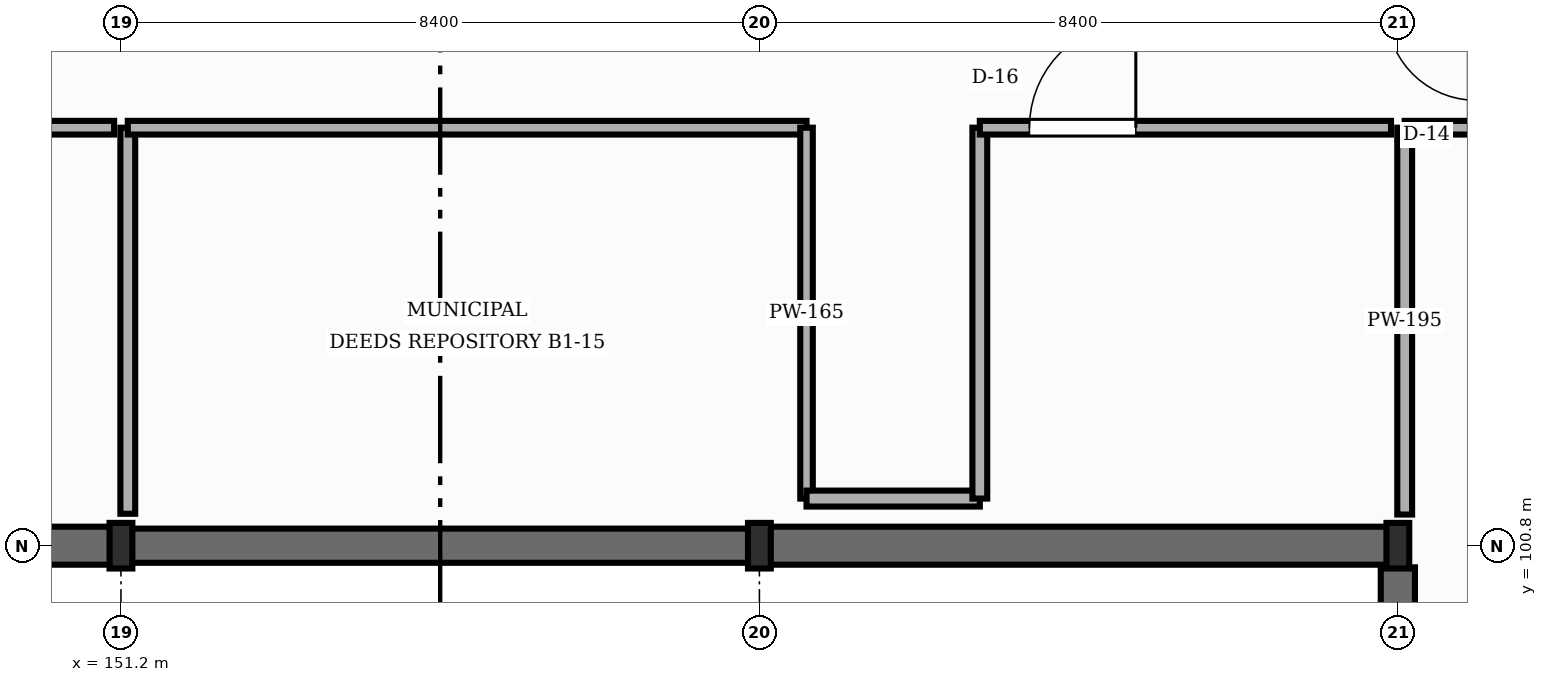
"""IFC4 building model, lengths in metres.
Left out: names, types, materials, properties, quantities, classifications, styles, units other than length and angle.
Written with IfcOpenShell. Run it as: python <this file> out.ifc"""

import sys

from ifc_helpers import new_model, si_unit, direction, frame, frame_2d, origin, origin_2d, place, context, subcontext, project, spatial, rectangle, i_section, extrude, element, fill, save


model = new_model("IFC4")
c1 = context("Model", 3, precision=1e-05, world=origin(), true_north=direction((0.0, 1.0)))
c2 = subcontext(c1, "Body", "Model", "MODEL_VIEW")
j1 = project(units=[si_unit("LENGTHUNIT", "METRE"), si_unit("PLANEANGLEUNIT", "RADIAN")], contexts=[c1])
p1 = place(None, origin())
s1 = spatial("IfcSite", under=j1, at=p1, CompositionType="ELEMENT")
p2 = place(p1, origin())
s2 = spatial("IfcBuilding", under=s1, at=p2, CompositionType="ELEMENT")
p3 = place(p2, frame((0.0, 0.0, -4.5)))
s3 = spatial("IfcBuildingStorey", under=s2, at=p3, CompositionType="ELEMENT", Elevation=-4.5)
for number, where, z_axis, x_axis in (
    (1, (151.2, 100.8, 0.0), (0.0, 0.0, 1.0), (1.0, 0.0, 0.0)),
    (2, (159.6, 100.8, 0.0), (0.0, 0.0, 1.0), (1.0, 0.0, 0.0)),
    (3, (168.0, 100.8, 0.0), (0.0, 0.0, 1.0), (1.0, 0.0, 0.0)),
):
    element("IfcColumn", number, at=place(p3, frame(where, z_axis=z_axis, x_axis=x_axis)), inside=s3, PredefinedType="COLUMN", context=c2, shape_type="SweptSolid", body=[
        extrude(i_section(OverallWidth=0.3, OverallDepth=0.6, WebThickness=0.015, FlangeThickness=0.03, FilletRadius=0.027, at=origin_2d()), origin(), (0.0, 0.0, 1.0), 4.5),
    ])
p4 = place(p3, frame((142.808, 100.8, 0.0), z_axis=(0.0, 0.0, 1.0), x_axis=(1.0, 0.0, 0.0)))
e4 = element("IfcWall", 4, at=p4, inside=s3, PredefinedType="USERDEFINED", context=c2, shape_type="SweptSolid", body=[
    extrude(rectangle(XDim=8.384, YDim=0.5, at=frame_2d((4.192, 0.0))), origin(), (0.0, 0.0, 1.0), 4.25),
])
p5 = place(p3, frame((151.208, 100.8, 0.0), z_axis=(0.0, 0.0, 1.0), x_axis=(1.0, 0.0, 0.0)))
e5 = element("IfcWall", 5, at=p5, inside=s3, PredefinedType="USERDEFINED", context=c2, shape_type="SweptSolid", body=[
    extrude(rectangle(XDim=8.384, YDim=0.45, at=frame_2d((4.192, 0.0))), origin(), (0.0, 0.0, 1.0), 4.25),
])
p6 = place(p3, frame((159.608, 100.8, 0.0), z_axis=(0.0, 0.0, 1.0), x_axis=(1.0, 0.0, 0.0)))
e6 = element("IfcWall", 6, at=p6, inside=s3, PredefinedType="USERDEFINED", context=c2, shape_type="SweptSolid", body=[
    extrude(rectangle(XDim=8.384, YDim=0.5, at=frame_2d((4.192, 0.0))), origin(), (0.0, 0.0, 1.0), 4.25),
])
p7 = place(p3, frame((168.0, 100.515, 0.0), z_axis=(0.0, 0.0, 1.0), x_axis=(0.0, -1.0, 0.0)))
e7 = element("IfcWall", 7, at=p7, inside=s3, PredefinedType="USERDEFINED", context=c2, shape_type="SweptSolid", body=[
    extrude(rectangle(XDim=7.83, YDim=0.45, at=frame_2d((3.915, 0.0))), origin(), (0.0, 0.0, 1.0), 4.25),
])
p8 = place(p3, frame((168.09, 101.21, -0.004), z_axis=(0.0, 0.0, 1.0), x_axis=(0.0, 1.0, 0.0)))
e8 = element("IfcWall", 8, at=p8, inside=s3, PredefinedType="STANDARD", context=c2, shape_type="SweptSolid", body=[
    extrude(rectangle(XDim=5.09, YDim=0.195, at=frame_2d((2.545, 0.0))), origin(), (0.0, 0.0, 1.0), 3.886),
])
p9 = place(p3, frame((168.09, 106.3, -0.004), z_axis=(0.0, 0.0, 1.0), x_axis=(1.0, 0.0, 0.0)))
e9 = element("IfcWall", 9, at=p9, inside=s3, PredefinedType="STANDARD", context=c2, shape_type="SweptSolid", body=[
    extrude(rectangle(XDim=0.94, YDim=0.18, at=frame_2d((0.47, 0.0))), origin(), (0.0, 0.0, 1.0), 4.254),
])
p10 = place(p3, frame((151.29, 101.22, -0.004), z_axis=(0.0, 0.0, 1.0), x_axis=(0.0, 1.0, 0.0)))
e10 = element("IfcWall", 10, at=p10, inside=s3, PredefinedType="STANDARD", context=c2, shape_type="SweptSolid", body=[
    extrude(rectangle(XDim=5.08, YDim=0.195, at=frame_2d((2.54, 0.0))), origin(), (0.0, 0.0, 1.0), 3.746),
])
p11 = place(p3, frame((151.29, 106.3, -0.004), z_axis=(0.0, 0.0, 1.0), x_axis=(1.0, 0.0, 0.0)))
e11 = element("IfcWall", 11, at=p11, inside=s3, PredefinedType="STANDARD", context=c2, shape_type="SweptSolid", body=[
    extrude(rectangle(XDim=8.93, YDim=0.18, at=frame_2d((4.465, 0.0))), origin(), (0.0, 0.0, 1.0), 4.254),
])
p12 = place(p3, frame((160.22, 106.3, -0.004), z_axis=(0.0, 0.0, 1.0), x_axis=(0.0, -1.0, 0.0)))
e12 = element("IfcWall", 12, at=p12, inside=s3, PredefinedType="STANDARD", context=c2, shape_type="SweptSolid", body=[
    extrude(rectangle(XDim=4.88, YDim=0.165, at=frame_2d((2.44, 0.0))), origin(), (0.0, 0.0, 1.0), 4.254),
])
p13 = place(p3, frame((160.22, 101.42, -0.004), z_axis=(0.0, 0.0, 1.0), x_axis=(1.0, 0.0, 0.0)))
e13 = element("IfcWall", 13, at=p13, inside=s3, PredefinedType="STANDARD", context=c2, shape_type="SweptSolid", body=[
    extrude(rectangle(XDim=2.28, YDim=0.21, at=frame_2d((1.14, 0.0))), origin(), (0.0, 0.0, 1.0), 4.254),
])
p14 = place(p3, frame((162.5, 101.42, -0.004), z_axis=(0.0, 0.0, 1.0), x_axis=(0.0, 1.0, 0.0)))
e14 = element("IfcWall", 14, at=p14, inside=s3, PredefinedType="STANDARD", context=c2, shape_type="SweptSolid", body=[
    extrude(rectangle(XDim=4.88, YDim=0.195, at=frame_2d((2.44, 0.0))), origin(), (0.0, 0.0, 1.0), 3.936),
])
p15 = place(p3, frame((162.5, 106.3, -0.004), z_axis=(0.0, 0.0, 1.0), x_axis=(1.0, 0.0, 0.0)))
e15 = element("IfcWall", 15, at=p15, inside=s3, PredefinedType="STANDARD", context=c2, shape_type="SweptSolid", body=[
    extrude(rectangle(XDim=5.41, YDim=0.18, at=frame_2d((2.705, 0.0))), origin(), (0.0, 0.0, 1.0), 4.254),
])
p16 = place(p15, frame((0.653, 0.0, 0.015)))
e16 = element("IfcOpeningElement", 16, at=p16, cuts=e15, PredefinedType="OPENING", context=c2, shape_type="SweptSolid", body=[
    extrude(rectangle(XDim=1.4, YDim=2.14, at=frame_2d((0.7, 1.07))), frame((0.0, 0.1, 0.0), z_axis=(0.0, -1.0, 0.0), x_axis=(1.0, 0.0, 0.0)), (0.0, 0.0, 1.0), 0.2),
])
p17 = place(p3, frame((145.7, 106.3, -0.004), z_axis=(0.0, 0.0, 1.0), x_axis=(1.0, 0.0, 0.0)))
e17 = element("IfcWall", 17, at=p17, inside=s3, PredefinedType="STANDARD", context=c2, shape_type="SweptSolid", body=[
    extrude(rectangle(XDim=5.41, YDim=0.18, at=frame_2d((2.705, 0.0))), origin(), (0.0, 0.0, 1.0), 4.254),
])
p18 = place(p17, frame((0.653, 0.0, 0.015)))
e18 = element("IfcOpeningElement", 18, at=p18, cuts=e17, PredefinedType="OPENING", context=c2, shape_type="SweptSolid", body=[
    extrude(rectangle(XDim=1.4, YDim=2.22, at=frame_2d((0.7, 1.11))), frame((0.0, 0.1, 0.0), z_axis=(0.0, -1.0, 0.0), x_axis=(1.0, 0.0, 0.0)), (0.0, 0.0, 1.0), 0.2),
])
p19 = place(p16, origin())
e19 = element("IfcDoor", 19, at=p19, inside=s3, OperationType="SINGLE_SWING_RIGHT", PredefinedType="DOOR", context=c2, shape_type="SweptSolid", body=[
    extrude(rectangle(XDim=1.4, YDim=2.14, at=frame_2d((0.7, 1.07))), frame((0.0, 0.025, 0.0), z_axis=(0.0, -1.0, 0.0), x_axis=(1.0, 0.0, 0.0)), (0.0, 0.0, 1.0), 0.05),
])
fill(e16, e19)
save(model, sys.argv[1])
